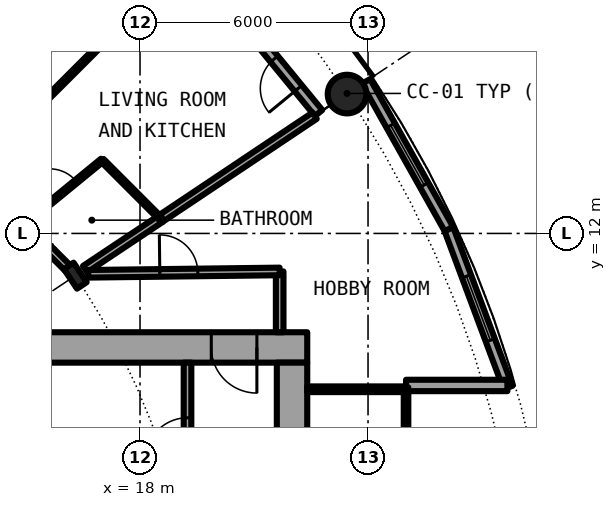
"""IFC4 building model, lengths in metres.
Left out: names, types, materials, properties, quantities, classifications, styles, units other than length and angle.
Written with IfcOpenShell. Run it as: python <this file> out.ifc"""

import sys

from ifc_helpers import new_model, si_unit, direction, frame, frame_2d, origin, origin_2d, place, context, subcontext, project, spatial, rectangle, hollow_circle, i_section, extrude, element, fill, save


model = new_model("IFC4")
c1 = context("Model", 3, precision=1e-05, world=origin(), true_north=direction((0.0, 1.0)))
c2 = subcontext(c1, "Body", "Model", "MODEL_VIEW")
j1 = project(units=[si_unit("LENGTHUNIT", "METRE"), si_unit("PLANEANGLEUNIT", "RADIAN")], contexts=[c1])
p1 = place(None, origin())
s1 = spatial("IfcSite", under=j1, at=p1, CompositionType="ELEMENT")
p2 = place(p1, origin())
s2 = spatial("IfcBuilding", under=s1, at=p2, CompositionType="ELEMENT")
p3 = place(p2, frame((0.0, 0.0, 35.0)))
s3 = spatial("IfcBuildingStorey", under=s2, at=p3, CompositionType="ELEMENT", Elevation=35.0)
p4 = place(p3, frame((23.448, 15.667, 0.0), z_axis=(0.0, 0.0, 1.0), x_axis=(1.0, 0.0, 0.0)))
e1 = element("IfcColumn", 1, at=p4, inside=s3, PredefinedType="COLUMN", context=c2, shape_type="SweptSolid", body=[
    extrude(hollow_circle(Radius=0.508, WallThickness=0.05, at=origin_2d()), origin(), (0.0, 0.0, 1.0), 3.05),
])
p5 = place(p3, frame((16.297, 10.889, 0.0), z_axis=(0.0, 0.0, 1.0), x_axis=(0.831469612303, 0.55557023302, 0.0)))
e2 = element("IfcColumn", 2, at=p5, inside=s3, PredefinedType="COLUMN", context=c2, shape_type="SweptSolid", body=[
    extrude(i_section(OverallWidth=0.305, OverallDepth=0.62, WebThickness=0.021, FlangeThickness=0.04, FilletRadius=0.027, at=origin_2d()), origin(), (0.0, 0.0, 1.0), 3.05),
])
p6 = place(p3, frame((22.699, 15.167, 0.0), z_axis=(0.0, 0.0, 1.0), x_axis=(-0.634382322723, 0.773019449054, 0.0)))
e3 = element("IfcWall", 3, at=p6, inside=s3, PredefinedType="SOLIDWALL", context=c2, shape_type="SweptSolid", body=[
    extrude(rectangle(XDim=5.352, YDim=0.25, at=frame_2d((2.676, 0.0))), origin(), (0.0, 0.0, 1.0), 2.7),
])
p7 = place(p6, frame((0.841, 0.0, 0.0)))
e4 = element("IfcOpeningElement", 4, at=p7, cuts=e3, PredefinedType="OPENING", context=c2, shape_type="SweptSolid", body=[
    extrude(rectangle(XDim=1.0, YDim=2.2, at=frame_2d((0.5, 1.1))), frame((0.0, 0.135, 0.0), z_axis=(0.0, -1.0, 0.0), x_axis=(1.0, 0.0, 0.0)), (0.0, 0.0, 1.0), 0.27),
])
p8 = place(p6, frame((3.111, 0.0, 0.3)))
e5 = element("IfcOpeningElement", 5, at=p8, cuts=e3, PredefinedType="OPENING", context=c2, shape_type="SweptSolid", body=[
    extrude(rectangle(XDim=1.8, YDim=2.1, at=frame_2d((0.9, 1.05))), frame((0.0, 0.135, 0.0), z_axis=(0.0, -1.0, 0.0), x_axis=(1.0, 0.0, 0.0)), (0.0, 0.0, 1.0), 0.27),
])
p9 = place(p3, frame((27.682, 7.945, 0.0), z_axis=(0.0, 0.0, 1.0), x_axis=(-0.349247811493, 0.937030397675, 0.0)))
e6 = element("IfcWall", 6, at=p9, inside=s3, PredefinedType="SOLIDWALL", context=c2, shape_type="SweptSolid", body=[
    extrude(rectangle(XDim=4.452, YDim=0.25, at=frame_2d((2.226, 0.0))), origin(), (0.0, 0.0, 1.0), 2.7),
])
p10 = place(p9, frame((1.327, 0.0, 0.3)))
e7 = element("IfcOpeningElement", 7, at=p10, cuts=e6, PredefinedType="OPENING", context=c2, shape_type="SweptSolid", body=[
    extrude(rectangle(XDim=1.8, YDim=2.1, at=frame_2d((0.9, 1.05))), frame((0.0, 0.135, 0.0), z_axis=(0.0, -1.0, 0.0), x_axis=(1.0, 0.0, 0.0)), (0.0, 0.0, 1.0), 0.27),
])
p11 = place(p3, frame((26.127, 12.117, 0.0), z_axis=(0.0, 0.0, 1.0), x_axis=(-0.489696356642, 0.871893042919, 0.0)))
e8 = element("IfcWall", 8, at=p11, inside=s3, PredefinedType="SOLIDWALL", context=c2, shape_type="SweptSolid", body=[
    extrude(rectangle(XDim=4.454, YDim=0.25, at=frame_2d((2.227, 0.0))), origin(), (0.0, 0.0, 1.0), 2.7),
])
p12 = place(p11, frame((1.327, 0.0, 0.3)))
e9 = element("IfcOpeningElement", 9, at=p12, cuts=e8, PredefinedType="OPENING", context=c2, shape_type="SweptSolid", body=[
    extrude(rectangle(XDim=1.8, YDim=2.1, at=frame_2d((0.9, 1.05))), frame((0.0, 0.135, 0.0), z_axis=(0.0, -1.0, 0.0), x_axis=(1.0, 0.0, 0.0)), (0.0, 0.0, 1.0), 0.27),
])
p13 = place(p3, frame((25.0, 8.0, 0.0), z_axis=(0.0, 0.0, 1.0), x_axis=(1.0, 0.0, 0.0)))
e10 = element("IfcWall", 10, at=p13, inside=s3, PredefinedType="SOLIDWALL", context=c2, shape_type="SweptSolid", body=[
    extrude(rectangle(XDim=2.667, YDim=0.3, at=frame_2d((1.333, 0.0))), origin(), (0.0, 0.0, 1.0), 2.7),
])
p14 = place(p3, frame((22.4, 9.0, 0.0), z_axis=(0.0, 0.0, 1.0), x_axis=(-1.0, 0.0, 0.0)))
e11 = element("IfcWall", 11, at=p14, inside=s3, PredefinedType="SHEAR", context=c2, shape_type="SweptSolid", body=[
    extrude(rectangle(XDim=14.2, YDim=0.8, at=frame_2d((7.1, 0.0))), origin(), (0.0, 0.0, 1.0), 3.05),
])
p15 = place(p14, frame((1.325, 0.0, 0.0)))
e12 = element("IfcOpeningElement", 12, at=p15, cuts=e11, PredefinedType="OPENING", context=c2, shape_type="SweptSolid", body=[
    extrude(rectangle(XDim=1.2, YDim=2.3, at=frame_2d((0.6, 1.15))), frame((0.0, 0.41, 0.0), z_axis=(0.0, -1.0, 0.0), x_axis=(1.0, 0.0, 0.0)), (0.0, 0.0, 1.0), 0.82),
])
p16 = place(p3, frame((22.0, 8.6, 0.0), z_axis=(0.0, 0.0, 1.0), x_axis=(0.0, -1.0, 0.0)))
e13 = element("IfcWall", 13, at=p16, inside=s3, PredefinedType="SHEAR", context=c2, shape_type="SweptSolid", body=[
    extrude(rectangle(XDim=17.2, YDim=0.8, at=frame_2d((8.6, 0.0))), origin(), (0.0, 0.0, 1.0), 3.05),
])
p17 = place(p16, frame((7.7, 0.0, 0.0)))
e14 = element("IfcOpeningElement", 14, at=p17, cuts=e13, PredefinedType="OPENING", context=c2, shape_type="SweptSolid", body=[
    extrude(rectangle(XDim=1.8, YDim=2.3, at=frame_2d((0.9, 1.15))), frame((0.0, 0.41, 0.0), z_axis=(0.0, -1.0, 0.0), x_axis=(1.0, 0.0, 0.0)), (0.0, 0.0, 1.0), 0.82),
])
p18 = place(p3, frame((19.25, 1.575, 0.0), z_axis=(0.0, 0.0, 1.0), x_axis=(0.0, 1.0, 0.0)))
e15 = element("IfcWall", 15, at=p18, inside=s3, PredefinedType="SOLIDWALL", context=c2, shape_type="SweptSolid", body=[
    extrude(rectangle(XDim=7.025, YDim=0.2, at=frame_2d((3.513, 0.0))), origin(), (0.0, 0.0, 1.0), 2.7),
])
p19 = place(p18, frame((4.475, 0.0, 0.0)))
e16 = element("IfcOpeningElement", 16, at=p19, cuts=e15, PredefinedType="OPENING", context=c2, shape_type="SweptSolid", body=[
    extrude(rectangle(XDim=1.1, YDim=2.3, at=frame_2d((0.55, 1.15))), frame((0.0, 0.11, 0.0), z_axis=(0.0, -1.0, 0.0), x_axis=(1.0, 0.0, 0.0)), (0.0, 0.0, 1.0), 0.22),
])
p20 = place(p3, frame((22.4, 7.9, 0.0), z_axis=(0.0, 0.0, 1.0), x_axis=(1.0, 0.0, 0.0)))
e17 = element("IfcWall", 17, at=p20, inside=s3, PredefinedType="PARTITIONING", context=c2, shape_type="SweptSolid", body=[
    extrude(rectangle(XDim=2.54, YDim=0.15, at=frame_2d((1.27, 0.0))), origin(), (0.0, 0.0, 1.0), 2.7),
])
p21 = place(p3, frame((25.0, -7.95, 0.0), z_axis=(0.0, 0.0, 1.0), x_axis=(0.0, 1.0, 0.0)))
e18 = element("IfcWall", 18, at=p21, inside=s3, PredefinedType="PARTITIONING", context=c2, shape_type="SweptSolid", body=[
    extrude(rectangle(XDim=15.9, YDim=0.12, at=frame_2d((7.95, 0.0))), origin(), (0.0, 0.0, 1.0), 2.7),
])
p22 = place(p21, frame((0.95, 0.0, 0.1)))
e19 = element("IfcOpeningElement", 19, at=p22, cuts=e18, PredefinedType="OPENING", context=c2, shape_type="SweptSolid", body=[
    extrude(rectangle(XDim=14.0, YDim=2.35, at=frame_2d((7.0, 1.175))), frame((0.0, 0.07, 0.0), z_axis=(0.0, -1.0, 0.0), x_axis=(1.0, 0.0, 0.0)), (0.0, 0.0, 1.0), 0.14),
])
p23 = place(p3, frame((21.675, 9.4, 0.0), z_axis=(0.0, 0.0, 1.0), x_axis=(0.0, 1.0, 0.0)))
e20 = element("IfcWall", 20, at=p23, inside=s3, PredefinedType="PARTITIONING", context=c2, shape_type="SweptSolid", body=[
    extrude(rectangle(XDim=1.6, YDim=0.2, at=frame_2d((0.8, 0.0))), origin(), (0.0, 0.0, 1.0), 2.7),
])
p24 = place(p3, frame((14.945, 12.241, 0.0), z_axis=(0.0, 0.0, 1.0), x_axis=(0.77367517848, 0.633582447834, 0.0)))
e21 = element("IfcWall", 21, at=p24, inside=s3, PredefinedType="PARTITIONING", context=c2, shape_type="SweptSolid", body=[
    extrude(rectangle(XDim=2.661, YDim=0.1, at=frame_2d((1.331, 0.0))), origin(), (0.0, 0.0, 1.0), 2.7),
])
p25 = place(p24, frame((0.881, 0.0, 0.0)))
e22 = element("IfcOpeningElement", 22, at=p25, cuts=e21, PredefinedType="OPENING", context=c2, shape_type="SweptSolid", body=[
    extrude(rectangle(XDim=0.9, YDim=2.3, at=frame_2d((0.45, 1.15))), frame((0.0, 0.06, 0.0), z_axis=(0.0, -1.0, 0.0), x_axis=(1.0, 0.0, 0.0)), (0.0, 0.0, 1.0), 0.12),
])
p26 = place(p3, frame((15.465, 15.465, 0.0), z_axis=(0.0, 0.0, 1.0), x_axis=(0.707106781187, 0.707106781187, 0.0)))
e23 = element("IfcWall", 23, at=p26, inside=s3, PredefinedType="PARTITIONING", context=c2, shape_type="SweptSolid", body=[
    extrude(rectangle(XDim=5.305, YDim=0.1, at=frame_2d((2.652, 0.0))), origin(), (0.0, 0.0, 1.0), 2.7),
])
p27 = place(p26, frame((2.202, 0.0, 0.0)))
e24 = element("IfcOpeningElement", 24, at=p27, cuts=e23, PredefinedType="OPENING", context=c2, shape_type="SweptSolid", body=[
    extrude(rectangle(XDim=0.9, YDim=2.3, at=frame_2d((0.45, 1.15))), frame((0.0, 0.06, 0.0), z_axis=(0.0, -1.0, 0.0), x_axis=(1.0, 0.0, 0.0)), (0.0, 0.0, 1.0), 0.12),
])
p28 = place(p3, frame((18.542, 12.389, 0.0), z_axis=(0.0, 0.0, 1.0), x_axis=(0.831387096605, 0.55569370664, 0.0)))
e25 = element("IfcWall", 25, at=p28, inside=s3, PredefinedType="PARTITIONING", context=c2, shape_type="SweptSolid", body=[
    extrude(rectangle(XDim=4.875, YDim=0.2, at=frame_2d((2.438, 0.0))), origin(), (0.0, 0.0, 1.0), 2.7),
])
p29 = place(p3, frame((16.555, 11.061, 0.0), z_axis=(0.0, 0.0, 1.0), x_axis=(0.832066006555, 0.554676627176, 0.0)))
e26 = element("IfcWall", 26, at=p29, inside=s3, PredefinedType="PARTITIONING", context=c2, shape_type="SweptSolid", body=[
    extrude(rectangle(XDim=2.39, YDim=0.2, at=frame_2d((1.195, 0.0))), origin(), (0.0, 0.0, 1.0), 2.7),
])
p30 = place(p3, frame((16.637, 10.938, 0.0), z_axis=(0.0, 0.0, 1.0), x_axis=(0.99992425795, 0.012307654658, 0.0)))
e27 = element("IfcWall", 27, at=p30, inside=s3, PredefinedType="PARTITIONING", context=c2, shape_type="SweptSolid", body=[
    extrude(rectangle(XDim=5.039, YDim=0.2, at=frame_2d((2.519, 0.0))), origin(), (0.0, 0.0, 1.0), 2.7),
])
p31 = place(p30, frame((1.884, 0.0, 0.0)))
e28 = element("IfcOpeningElement", 28, at=p31, cuts=e27, PredefinedType="OPENING", context=c2, shape_type="SweptSolid", body=[
    extrude(rectangle(XDim=1.0, YDim=2.3, at=frame_2d((0.5, 1.15))), frame((0.0, 0.11, 0.0), z_axis=(0.0, -1.0, 0.0), x_axis=(1.0, 0.0, 0.0)), (0.0, 0.0, 1.0), 0.22),
])
p32 = place(p3, frame((10.999, 16.187, 0.0), z_axis=(0.0, 0.0, 1.0), x_axis=(0.707106781187, -0.707106781187, 0.0)))
e29 = element("IfcWall", 29, at=p32, inside=s3, PredefinedType="PARTITIONING", context=c2, shape_type="SweptSolid", body=[
    extrude(rectangle(XDim=7.337, YDim=0.2, at=frame_2d((3.668, 0.0))), origin(), (0.0, 0.0, 1.0), 2.38),
])
p33 = place(p32, frame((2.212, 0.0, 0.0)))
e30 = element("IfcOpeningElement", 30, at=p33, cuts=e29, PredefinedType="OPENING", context=c2, shape_type="SweptSolid", body=[
    extrude(rectangle(XDim=1.0, YDim=2.3, at=frame_2d((0.5, 1.15))), frame((0.0, 0.11, 0.0), z_axis=(0.0, -1.0, 0.0), x_axis=(1.0, 0.0, 0.0)), (0.0, 0.0, 1.0), 0.22),
])
p34 = place(p3, frame((17.006, 13.924, 0.0), z_axis=(0.0, 0.0, 1.0), x_axis=(0.706826194425, -0.707387256653, 0.0)))
e31 = element("IfcWall", 31, at=p34, inside=s3, PredefinedType="PARTITIONING", context=c2, shape_type="SweptSolid", body=[
    extrude(rectangle(XDim=2.176, YDim=0.1, at=frame_2d((1.088, 0.0))), origin(), (0.0, 0.0, 1.0), 2.7),
])
p35 = place(p7, origin())
e32 = element("IfcDoor", 32, at=p35, inside=s3, OperationType="SINGLE_SWING_LEFT", PredefinedType="DOOR", context=c2, shape_type="SweptSolid", body=[
    extrude(rectangle(XDim=1.0, YDim=2.2, at=frame_2d((0.5, 1.1))), frame((0.0, 0.025, 0.0), z_axis=(0.0, -1.0, 0.0), x_axis=(1.0, 0.0, 0.0)), (0.0, 0.0, 1.0), 0.05),
])
fill(e4, e32)
p36 = place(p10, origin())
e33 = element("IfcWindow", 33, at=p36, inside=s3, PartitioningType="SINGLE_PANEL", PredefinedType="WINDOW", context=c2, shape_type="SweptSolid", body=[
    extrude(rectangle(XDim=1.8, YDim=2.1, at=frame_2d((0.9, 1.05))), frame((0.0, 0.03, 0.0), z_axis=(0.0, -1.0, 0.0), x_axis=(1.0, 0.0, 0.0)), (0.0, 0.0, 1.0), 0.06),
])
fill(e7, e33)
p37 = place(p12, origin())
e34 = element("IfcWindow", 34, at=p37, inside=s3, PartitioningType="SINGLE_PANEL", PredefinedType="WINDOW", context=c2, shape_type="SweptSolid", body=[
    extrude(rectangle(XDim=1.8, YDim=2.1, at=frame_2d((0.9, 1.05))), frame((0.0, 0.03, 0.0), z_axis=(0.0, -1.0, 0.0), x_axis=(1.0, 0.0, 0.0)), (0.0, 0.0, 1.0), 0.06),
])
fill(e9, e34)
p38 = place(p19, origin())
e35 = element("IfcDoor", 35, at=p38, inside=s3, OperationType="SINGLE_SWING_LEFT", PredefinedType="DOOR", context=c2, shape_type="SweptSolid", body=[
    extrude(rectangle(XDim=1.1, YDim=2.3, at=frame_2d((0.55, 1.15))), frame((0.0, 0.025, 0.0), z_axis=(0.0, -1.0, 0.0), x_axis=(1.0, 0.0, 0.0)), (0.0, 0.0, 1.0), 0.05),
])
fill(e16, e35)
p39 = place(p15, origin())
e36 = element("IfcDoor", 36, at=p39, inside=s3, OperationType="SINGLE_SWING_RIGHT", PredefinedType="DOOR", context=c2, shape_type="SweptSolid", body=[
    extrude(rectangle(XDim=1.2, YDim=2.3, at=frame_2d((0.6, 1.15))), frame((0.0, 0.025, 0.0), z_axis=(0.0, -1.0, 0.0), x_axis=(1.0, 0.0, 0.0)), (0.0, 0.0, 1.0), 0.05),
])
fill(e12, e36)
p40 = place(p22, origin())
e37 = element("IfcWindow", 37, at=p40, inside=s3, PartitioningType="SINGLE_PANEL", PredefinedType="WINDOW", context=c2, shape_type="SweptSolid", body=[
    extrude(rectangle(XDim=14.0, YDim=2.35, at=frame_2d((7.0, 1.175))), frame((0.0, 0.03, 0.0), z_axis=(0.0, -1.0, 0.0), x_axis=(1.0, 0.0, 0.0)), (0.0, 0.0, 1.0), 0.06),
])
fill(e19, e37)
p41 = place(p25, origin())
e38 = element("IfcDoor", 38, at=p41, inside=s3, OperationType="SINGLE_SWING_LEFT", PredefinedType="DOOR", context=c2, shape_type="SweptSolid", body=[
    extrude(rectangle(XDim=0.9, YDim=2.3, at=frame_2d((0.45, 1.15))), frame((0.0, 0.025, 0.0), z_axis=(0.0, -1.0, 0.0), x_axis=(1.0, 0.0, 0.0)), (0.0, 0.0, 1.0), 0.05),
])
fill(e22, e38)
p42 = place(p31, origin())
e39 = element("IfcDoor", 39, at=p42, inside=s3, OperationType="SINGLE_SWING_LEFT", PredefinedType="DOOR", context=c2, shape_type="SweptSolid", body=[
    extrude(rectangle(XDim=1.0, YDim=2.3, at=frame_2d((0.5, 1.15))), frame((0.0, 0.025, 0.0), z_axis=(0.0, -1.0, 0.0), x_axis=(1.0, 0.0, 0.0)), (0.0, 0.0, 1.0), 0.05),
])
fill(e28, e39)
save(model, sys.argv[1])
